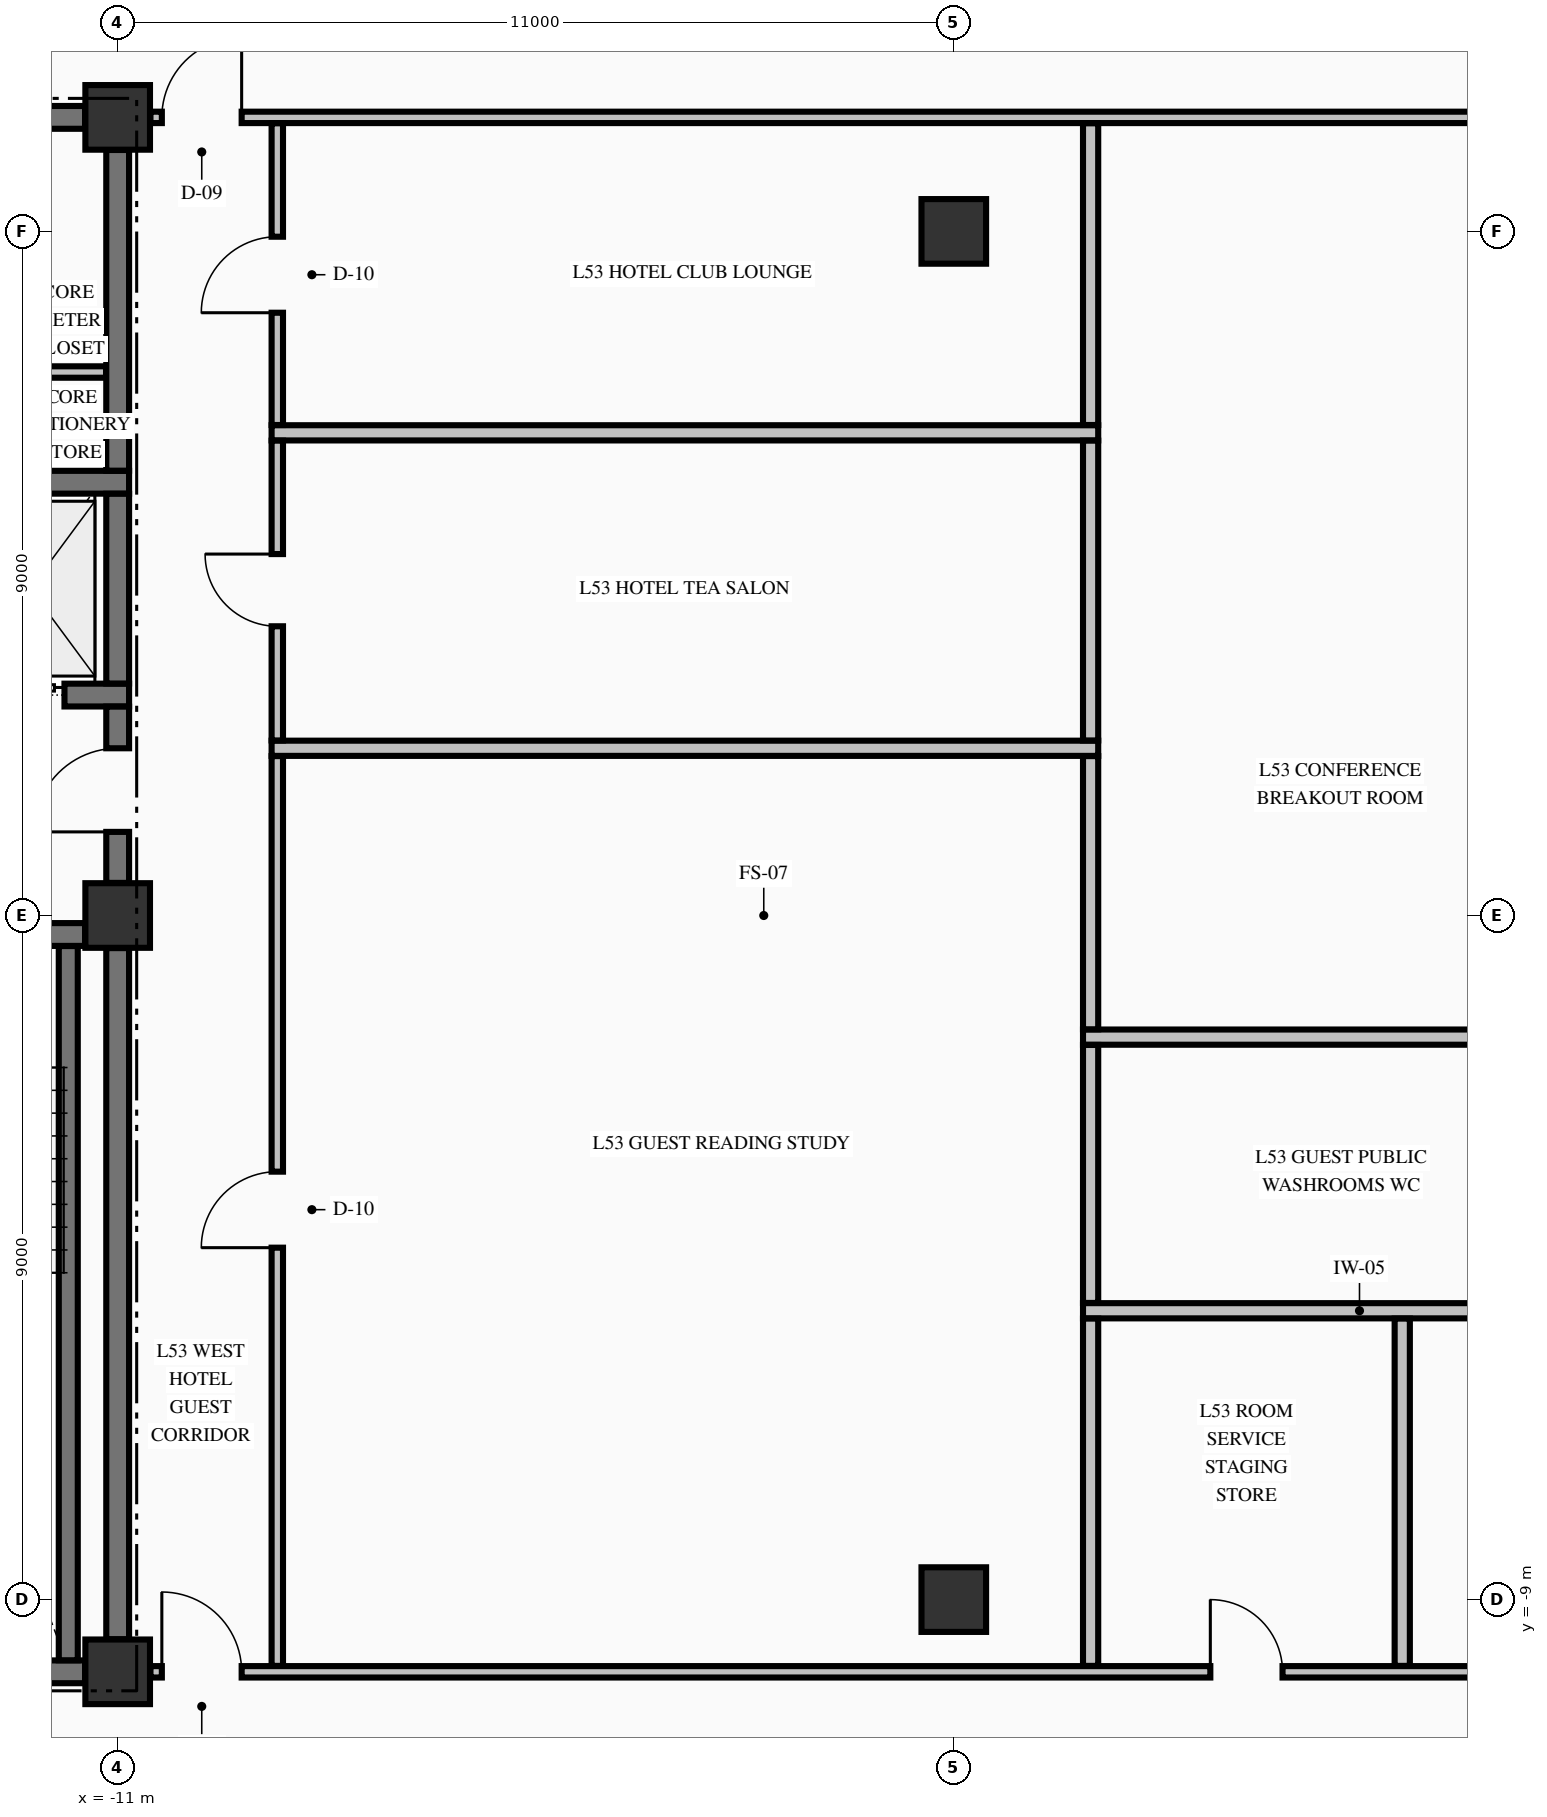
"""IFC4 building model, lengths in metres.
Left out: names, types, materials, properties, quantities, classifications, styles, units other than length and angle.
Written with IfcOpenShell. Run it as: python <this file> out.ifc"""

import sys

from ifc_helpers import new_model, si_unit, direction, frame, frame_2d, origin, origin_2d, place, context, subcontext, project, spatial, rectangle, extrude, element, fill, save


model = new_model("IFC4")
c1 = context("Model", 3, precision=1e-05, world=origin(), true_north=direction((0.0, 1.0)))
c2 = subcontext(c1, "Body", "Model", "MODEL_VIEW")
j1 = project(units=[si_unit("LENGTHUNIT", "METRE"), si_unit("PLANEANGLEUNIT", "RADIAN")], contexts=[c1])
p1 = place(None, origin())
s1 = spatial("IfcSite", under=j1, at=p1, CompositionType="ELEMENT")
p2 = place(p1, origin())
s2 = spatial("IfcBuilding", under=s1, at=p2, CompositionType="ELEMENT")
p3 = place(p2, frame((0.0, 0.0, 205.06)))
s3 = spatial("IfcBuildingStorey", under=s2, at=p3, CompositionType="ELEMENT", Elevation=205.06)
for number, where, z_axis, x_axis in (
    (1, (-11.0, -9.95, -0.25), (0.0, 0.0, 1.0), (1.0, 0.0, 0.0)),
    (2, (-11.0, 0.0, -0.25), (0.0, 0.0, 1.0), (1.0, 0.0, 0.0)),
    (3, (-11.0, 10.5, -0.25), (0.0, 0.0, 1.0), (1.0, 0.0, 0.0)),
    (4, (0.0, -9.0, -0.25), (0.0, 0.0, 1.0), (1.0, 0.0, 0.0)),
    (5, (0.0, 9.0, -0.25), (0.0, 0.0, 1.0), (1.0, 0.0, 0.0)),
):
    element("IfcColumn", number, at=place(p3, frame(where, z_axis=z_axis, x_axis=x_axis)), inside=s3, PredefinedType="COLUMN", context=c2, shape_type="SweptSolid", body=[
        extrude(rectangle(XDim=0.85, YDim=0.85, at=origin_2d()), origin(), (0.0, 0.0, 1.0), 3.4),
    ])
p4 = place(p3, frame((-14.7, -9.95, 0.0), z_axis=(0.0, 0.0, 1.0), x_axis=(1.0, 0.0, 0.0)))
e6 = element("IfcWall", 6, at=p4, inside=s3, PredefinedType="SHEAR", context=c2, shape_type="SweptSolid", body=[
    extrude(rectangle(XDim=3.271, YDim=0.3, at=frame_2d((1.635, 0.0))), origin(), (0.0, 0.0, 1.0), 3.15),
])
p5 = place(p3, frame((-19.571, -0.25, 0.0), z_axis=(0.0, 0.0, 1.0), x_axis=(1.0, 0.0, 0.0)))
e7 = element("IfcWall", 7, at=p5, inside=s3, PredefinedType="SHEAR", context=c2, shape_type="SweptSolid", body=[
    extrude(rectangle(XDim=8.142, YDim=0.3, at=frame_2d((4.071, 0.0))), origin(), (0.0, 0.0, 1.0), 3.15),
])
p6 = place(p5, frame((5.871, 0.0, 0.0)))
e8 = element("IfcOpeningElement", 8, at=p6, cuts=e7, PredefinedType="OPENING", context=c2, shape_type="SweptSolid", body=[
    extrude(rectangle(XDim=1.1, YDim=2.15, at=frame_2d((0.55, 1.075))), frame((0.0, 0.16, 0.0), z_axis=(0.0, -1.0, 0.0), x_axis=(1.0, 0.0, 0.0)), (0.0, 0.0, 1.0), 0.32),
])
p7 = place(p3, frame((-14.875, 2.9, 0.0), z_axis=(0.0, 0.0, 1.0), x_axis=(1.0, 0.0, 0.0)))
e9 = element("IfcWall", 9, at=p7, inside=s3, PredefinedType="SHEAR", context=c2, shape_type="SweptSolid", body=[
    extrude(rectangle(XDim=4.025, YDim=0.3, at=frame_2d((2.012, 0.0))), origin(), (0.0, 0.0, 1.0), 3.15),
])
p8 = place(p7, frame((2.075, 0.0, 0.0)))
e10 = element("IfcOpeningElement", 10, at=p8, cuts=e9, PredefinedType="OPENING", context=c2, shape_type="SweptSolid", body=[
    extrude(rectangle(XDim=1.1, YDim=2.2, at=frame_2d((0.55, 1.1))), frame((0.0, 0.16, 0.0), z_axis=(0.0, -1.0, 0.0), x_axis=(1.0, 0.0, 0.0)), (0.0, 0.0, 1.0), 0.32),
])
p9 = place(p3, frame((-14.875, 5.7, 0.0), z_axis=(0.0, 0.0, 1.0), x_axis=(1.0, 0.0, 0.0)))
e11 = element("IfcWall", 11, at=p9, inside=s3, PredefinedType="SHEAR", context=c2, shape_type="SweptSolid", body=[
    extrude(rectangle(XDim=4.025, YDim=0.3, at=frame_2d((2.012, 0.0))), origin(), (0.0, 0.0, 1.0), 3.15),
])
p10 = place(p3, frame((-14.7, 10.5, 0.0), z_axis=(0.0, 0.0, 1.0), x_axis=(1.0, 0.0, 0.0)))
e12 = element("IfcWall", 12, at=p10, inside=s3, PredefinedType="SHEAR", context=c2, shape_type="SweptSolid", body=[
    extrude(rectangle(XDim=3.271, YDim=0.3, at=frame_2d((1.635, 0.0))), origin(), (0.0, 0.0, 1.0), 3.15),
])
p11 = place(p10, frame((0.305, 0.0, 0.0)))
e13 = element("IfcOpeningElement", 13, at=p11, cuts=e12, PredefinedType="OPENING", context=c2, shape_type="SweptSolid", body=[
    extrude(rectangle(XDim=0.95, YDim=2.15, at=frame_2d((0.475, 1.075))), frame((0.0, 0.16, 0.0), z_axis=(0.0, -1.0, 0.0), x_axis=(1.0, 0.0, 0.0)), (0.0, 0.0, 1.0), 0.32),
])
p12 = place(p3, frame((-10.569, -9.95, 0.0), z_axis=(0.0, 0.0, 1.0), x_axis=(1.0, 0.0, 0.0)))
e14 = element("IfcWall", 14, at=p12, inside=s3, PredefinedType="PARTITIONING", context=c2, shape_type="SweptSolid", body=[
    extrude(rectangle(XDim=21.138, YDim=0.15, at=frame_2d((10.569, 0.0))), origin(), (0.0, 0.0, 1.0), 3.15),
])
p13 = place(p12, frame((0.15, 0.0, 0.0)))
e15 = element("IfcOpeningElement", 15, at=p13, cuts=e14, PredefinedType="OPENING", context=c2, shape_type="SweptSolid", body=[
    extrude(rectangle(XDim=1.05, YDim=2.15, at=frame_2d((0.525, 1.075))), frame((0.0, 0.085, 0.0), z_axis=(0.0, -1.0, 0.0), x_axis=(1.0, 0.0, 0.0)), (0.0, 0.0, 1.0), 0.17),
])
p14 = place(p12, frame((19.938, 0.0, 0.0)))
e16 = element("IfcOpeningElement", 16, at=p14, cuts=e14, PredefinedType="OPENING", context=c2, shape_type="SweptSolid", body=[
    extrude(rectangle(XDim=1.05, YDim=2.15, at=frame_2d((0.525, 1.075))), frame((0.0, 0.085, 0.0), z_axis=(0.0, -1.0, 0.0), x_axis=(1.0, 0.0, 0.0)), (0.0, 0.0, 1.0), 0.17),
])
p15 = place(p12, frame((13.944, 0.0, 0.0)))
e17 = element("IfcOpeningElement", 17, at=p15, cuts=e14, PredefinedType="OPENING", context=c2, shape_type="SweptSolid", body=[
    extrude(rectangle(XDim=0.95, YDim=2.15, at=frame_2d((0.475, 1.075))), frame((0.0, 0.085, 0.0), z_axis=(0.0, -1.0, 0.0), x_axis=(1.0, 0.0, 0.0)), (0.0, 0.0, 1.0), 0.17),
])
for number, where, z_axis, x_axis in (
    (18, (1.7, -5.2, 0.0), (0.0, 0.0, 1.0), (1.0, 0.0, 0.0)),
    (19, (1.7, -1.6, 0.0), (0.0, 0.0, 1.0), (1.0, 0.0, 0.0)),
):
    element("IfcWall", number, at=place(p3, frame(where, z_axis=z_axis, x_axis=x_axis)), inside=s3, PredefinedType="PARTITIONING", context=c2, shape_type="SweptSolid", body=[
        extrude(rectangle(XDim=7.275, YDim=0.2, at=frame_2d((3.638, 0.0))), origin(), (0.0, 0.0, 1.0), 3.15),
    ])
for number, where, z_axis, x_axis in (
    (20, (-8.975, 2.2, 0.0), (0.0, 0.0, 1.0), (1.0, 0.0, 0.0)),
    (21, (-8.975, 6.35, 0.0), (0.0, 0.0, 1.0), (1.0, 0.0, 0.0)),
):
    element("IfcWall", number, at=place(p3, frame(where, z_axis=z_axis, x_axis=x_axis)), inside=s3, PredefinedType="PARTITIONING", context=c2, shape_type="SweptSolid", body=[
        extrude(rectangle(XDim=10.875, YDim=0.2, at=frame_2d((5.438, 0.0))), origin(), (0.0, 0.0, 1.0), 3.15),
    ])
p16 = place(p3, frame((-13.225, 7.15, 0.0), z_axis=(0.0, 0.0, 1.0), x_axis=(1.0, 0.0, 0.0)))
e22 = element("IfcWall", 22, at=p16, inside=s3, PredefinedType="PARTITIONING", context=c2, shape_type="SweptSolid", body=[
    extrude(rectangle(XDim=2.072, YDim=0.15, at=frame_2d((1.036, 0.0))), origin(), (0.0, 0.0, 1.0), 3.15),
])
p17 = place(p3, frame((-10.569, 10.5, 0.0), z_axis=(0.0, 0.0, 1.0), x_axis=(1.0, 0.0, 0.0)))
e23 = element("IfcWall", 23, at=p17, inside=s3, PredefinedType="PARTITIONING", context=c2, shape_type="SweptSolid", body=[
    extrude(rectangle(XDim=21.138, YDim=0.15, at=frame_2d((10.569, 0.0))), origin(), (0.0, 0.0, 1.0), 3.15),
])
p18 = place(p17, frame((0.15, 0.0, 0.0)))
e24 = element("IfcOpeningElement", 24, at=p18, cuts=e23, PredefinedType="OPENING", context=c2, shape_type="SweptSolid", body=[
    extrude(rectangle(XDim=1.05, YDim=2.15, at=frame_2d((0.525, 1.075))), frame((0.0, 0.085, 0.0), z_axis=(0.0, -1.0, 0.0), x_axis=(1.0, 0.0, 0.0)), (0.0, 0.0, 1.0), 0.17),
])
p19 = place(p17, frame((19.938, 0.0, 0.0)))
e25 = element("IfcOpeningElement", 25, at=p19, cuts=e23, PredefinedType="OPENING", context=c2, shape_type="SweptSolid", body=[
    extrude(rectangle(XDim=1.05, YDim=2.15, at=frame_2d((0.525, 1.075))), frame((0.0, 0.085, 0.0), z_axis=(0.0, -1.0, 0.0), x_axis=(1.0, 0.0, 0.0)), (0.0, 0.0, 1.0), 0.17),
])
p20 = place(p3, frame((-11.65, -9.798, 0.0), z_axis=(0.0, 0.0, 1.0), x_axis=(0.0, 1.0, 0.0)))
e26 = element("IfcWall", 26, at=p20, inside=s3, PredefinedType="SOLIDWALL", context=c2, shape_type="SweptSolid", body=[
    extrude(rectangle(XDim=9.396, YDim=0.25, at=frame_2d((4.698, 0.0))), origin(), (0.0, 0.0, 1.0), 3.15),
])
p21 = place(p3, frame((-11.0, -9.521, 0.0), z_axis=(0.0, 0.0, 1.0), x_axis=(0.0, 1.0, 0.0)))
e27 = element("IfcWall", 27, at=p21, inside=s3, PredefinedType="SHEAR", context=c2, shape_type="SweptSolid", body=[
    extrude(rectangle(XDim=9.092, YDim=0.3, at=frame_2d((4.546, 0.0))), origin(), (0.0, 0.0, 1.0), 3.15),
])
p22 = place(p3, frame((-11.0, 0.429, 0.0), z_axis=(0.0, 0.0, 1.0), x_axis=(0.0, 1.0, 0.0)))
e28 = element("IfcWall", 28, at=p22, inside=s3, PredefinedType="SHEAR", context=c2, shape_type="SweptSolid", body=[
    extrude(rectangle(XDim=2.319, YDim=0.3, at=frame_2d((1.16, 0.0))), origin(), (0.0, 0.0, 1.0), 3.15),
])
p23 = place(p22, frame((0.671, 0.0, 0.0)))
e29 = element("IfcOpeningElement", 29, at=p23, cuts=e28, PredefinedType="OPENING", context=c2, shape_type="SweptSolid", body=[
    extrude(rectangle(XDim=1.1, YDim=2.15, at=frame_2d((0.55, 1.075))), frame((0.0, 0.16, 0.0), z_axis=(0.0, -1.0, 0.0), x_axis=(1.0, 0.0, 0.0)), (0.0, 0.0, 1.0), 0.32),
])
p24 = place(p3, frame((-11.0, 3.052, 0.0), z_axis=(0.0, 0.0, 1.0), x_axis=(0.0, 1.0, 0.0)))
e30 = element("IfcWall", 30, at=p24, inside=s3, PredefinedType="SHEAR", context=c2, shape_type="SweptSolid", body=[
    extrude(rectangle(XDim=2.496, YDim=0.3, at=frame_2d((1.248, 0.0))), origin(), (0.0, 0.0, 1.0), 3.15),
])
p25 = place(p3, frame((-11.0, 5.852, 0.0), z_axis=(0.0, 0.0, 1.0), x_axis=(0.0, 1.0, 0.0)))
e31 = element("IfcWall", 31, at=p25, inside=s3, PredefinedType="SHEAR", context=c2, shape_type="SweptSolid", body=[
    extrude(rectangle(XDim=4.219, YDim=0.3, at=frame_2d((2.109, 0.0))), origin(), (0.0, 0.0, 1.0), 3.15),
])
p26 = place(p3, frame((-8.9, -9.872, 0.0), z_axis=(0.0, 0.0, 1.0), x_axis=(0.0, 1.0, 0.0)))
e32 = element("IfcWall", 32, at=p26, inside=s3, PredefinedType="PARTITIONING", context=c2, shape_type="SweptSolid", body=[
    extrude(rectangle(XDim=11.969, YDim=0.15, at=frame_2d((5.984, 0.0))), origin(), (0.0, 0.0, 1.0), 3.15),
])
p27 = place(p26, frame((5.502, 0.0, 0.0)))
e33 = element("IfcOpeningElement", 33, at=p27, cuts=e32, PredefinedType="OPENING", context=c2, shape_type="SweptSolid", body=[
    extrude(rectangle(XDim=1.0, YDim=2.15, at=frame_2d((0.5, 1.075))), frame((0.0, 0.085, 0.0), z_axis=(0.0, -1.0, 0.0), x_axis=(1.0, 0.0, 0.0)), (0.0, 0.0, 1.0), 0.17),
])
p28 = place(p3, frame((-8.9, 2.303, 0.0), z_axis=(0.0, 0.0, 1.0), x_axis=(0.0, 1.0, 0.0)))
e34 = element("IfcWall", 34, at=p28, inside=s3, PredefinedType="PARTITIONING", context=c2, shape_type="SweptSolid", body=[
    extrude(rectangle(XDim=3.944, YDim=0.15, at=frame_2d((1.972, 0.0))), origin(), (0.0, 0.0, 1.0), 3.15),
])
p29 = place(p28, frame((1.502, 0.0, 0.0)))
e35 = element("IfcOpeningElement", 35, at=p29, cuts=e34, PredefinedType="OPENING", context=c2, shape_type="SweptSolid", body=[
    extrude(rectangle(XDim=0.95, YDim=2.15, at=frame_2d((0.475, 1.075))), frame((0.0, 0.085, 0.0), z_axis=(0.0, -1.0, 0.0), x_axis=(1.0, 0.0, 0.0)), (0.0, 0.0, 1.0), 0.17),
])
p30 = place(p3, frame((-8.9, 6.453, 0.0), z_axis=(0.0, 0.0, 1.0), x_axis=(0.0, 1.0, 0.0)))
e36 = element("IfcWall", 36, at=p30, inside=s3, PredefinedType="PARTITIONING", context=c2, shape_type="SweptSolid", body=[
    extrude(rectangle(XDim=3.969, YDim=0.15, at=frame_2d((1.985, 0.0))), origin(), (0.0, 0.0, 1.0), 3.15),
])
p31 = place(p30, frame((1.477, 0.0, 0.0)))
e37 = element("IfcOpeningElement", 37, at=p31, cuts=e36, PredefinedType="OPENING", context=c2, shape_type="SweptSolid", body=[
    extrude(rectangle(XDim=1.0, YDim=2.15, at=frame_2d((0.5, 1.075))), frame((0.0, 0.085, 0.0), z_axis=(0.0, -1.0, 0.0), x_axis=(1.0, 0.0, 0.0)), (0.0, 0.0, 1.0), 0.17),
])
p32 = place(p3, frame((1.8, -9.872, 0.0), z_axis=(0.0, 0.0, 1.0), x_axis=(0.0, 1.0, 0.0)))
e38 = element("IfcWall", 38, at=p32, inside=s3, PredefinedType="PARTITIONING", context=c2, shape_type="SweptSolid", body=[
    extrude(rectangle(XDim=4.569, YDim=0.2, at=frame_2d((2.285, 0.0))), origin(), (0.0, 0.0, 1.0), 3.15),
])
p33 = place(p3, frame((1.8, -5.097, 0.0), z_axis=(0.0, 0.0, 1.0), x_axis=(0.0, 1.0, 0.0)))
e39 = element("IfcWall", 39, at=p33, inside=s3, PredefinedType="PARTITIONING", context=c2, shape_type="SweptSolid", body=[
    extrude(rectangle(XDim=3.394, YDim=0.2, at=frame_2d((1.697, 0.0))), origin(), (0.0, 0.0, 1.0), 3.15),
])
p34 = place(p3, frame((1.8, -1.497, 0.0), z_axis=(0.0, 0.0, 1.0), x_axis=(0.0, 1.0, 0.0)))
e40 = element("IfcWall", 40, at=p34, inside=s3, PredefinedType="PARTITIONING", context=c2, shape_type="SweptSolid", body=[
    extrude(rectangle(XDim=3.594, YDim=0.2, at=frame_2d((1.797, 0.0))), origin(), (0.0, 0.0, 1.0), 3.15),
])
p35 = place(p3, frame((1.8, 2.303, 0.0), z_axis=(0.0, 0.0, 1.0), x_axis=(0.0, 1.0, 0.0)))
e41 = element("IfcWall", 41, at=p35, inside=s3, PredefinedType="PARTITIONING", context=c2, shape_type="SweptSolid", body=[
    extrude(rectangle(XDim=3.944, YDim=0.2, at=frame_2d((1.972, 0.0))), origin(), (0.0, 0.0, 1.0), 3.15),
])
p36 = place(p3, frame((1.8, 6.453, 0.0), z_axis=(0.0, 0.0, 1.0), x_axis=(0.0, 1.0, 0.0)))
e42 = element("IfcWall", 42, at=p36, inside=s3, PredefinedType="PARTITIONING", context=c2, shape_type="SweptSolid", body=[
    extrude(rectangle(XDim=3.969, YDim=0.2, at=frame_2d((1.985, 0.0))), origin(), (0.0, 0.0, 1.0), 3.15),
])
p37 = place(p3, frame((5.9, -9.872, 0.0), z_axis=(0.0, 0.0, 1.0), x_axis=(0.0, 1.0, 0.0)))
e43 = element("IfcWall", 43, at=p37, inside=s3, PredefinedType="PARTITIONING", context=c2, shape_type="SweptSolid", body=[
    extrude(rectangle(XDim=4.569, YDim=0.2, at=frame_2d((2.285, 0.0))), origin(), (0.0, 0.0, 1.0), 3.15),
])
p38 = place(p23, origin())
e44 = element("IfcDoor", 44, at=p38, inside=s3, OperationType="SINGLE_SWING_LEFT", PredefinedType="DOOR", context=c2, shape_type="SweptSolid", body=[
    extrude(rectangle(XDim=1.1, YDim=2.15, at=frame_2d((0.55, 1.075))), frame((0.0, 0.025, 0.0), z_axis=(0.0, -1.0, 0.0), x_axis=(1.0, 0.0, 0.0)), (0.0, 0.0, 1.0), 0.05),
])
fill(e29, e44)
p39 = place(p8, origin())
e45 = element("IfcDoor", 45, at=p39, inside=s3, OperationType="SLIDING_TO_LEFT", PredefinedType="DOOR", context=c2, shape_type="SweptSolid", body=[
    extrude(rectangle(XDim=1.1, YDim=2.2, at=frame_2d((0.55, 1.1))), frame((0.0, 0.025, 0.0), z_axis=(0.0, -1.0, 0.0), x_axis=(1.0, 0.0, 0.0)), (0.0, 0.0, 1.0), 0.05),
])
fill(e10, e45)
p40 = place(p18, origin())
e46 = element("IfcDoor", 46, at=p40, inside=s3, OperationType="SINGLE_SWING_RIGHT", PredefinedType="DOOR", context=c2, shape_type="SweptSolid", body=[
    extrude(rectangle(XDim=1.05, YDim=2.15, at=frame_2d((0.525, 1.075))), frame((0.0, 0.025, 0.0), z_axis=(0.0, -1.0, 0.0), x_axis=(1.0, 0.0, 0.0)), (0.0, 0.0, 1.0), 0.05),
])
fill(e24, e46)
p41 = place(p13, origin())
e47 = element("IfcDoor", 47, at=p41, inside=s3, OperationType="SINGLE_SWING_LEFT", PredefinedType="DOOR", context=c2, shape_type="SweptSolid", body=[
    extrude(rectangle(XDim=1.05, YDim=2.15, at=frame_2d((0.525, 1.075))), frame((0.0, 0.025, 0.0), z_axis=(0.0, -1.0, 0.0), x_axis=(1.0, 0.0, 0.0)), (0.0, 0.0, 1.0), 0.05),
])
fill(e15, e47)
p42 = place(p31, origin())
e48 = element("IfcDoor", 48, at=p42, inside=s3, OperationType="SINGLE_SWING_LEFT", PredefinedType="DOOR", context=c2, shape_type="SweptSolid", body=[
    extrude(rectangle(XDim=1.0, YDim=2.15, at=frame_2d((0.5, 1.075))), frame((0.0, 0.025, 0.0), z_axis=(0.0, -1.0, 0.0), x_axis=(1.0, 0.0, 0.0)), (0.0, 0.0, 1.0), 0.05),
])
fill(e37, e48)
p43 = place(p29, origin())
e49 = element("IfcDoor", 49, at=p43, inside=s3, OperationType="SINGLE_SWING_RIGHT", PredefinedType="DOOR", context=c2, shape_type="SweptSolid", body=[
    extrude(rectangle(XDim=0.95, YDim=2.15, at=frame_2d((0.475, 1.075))), frame((0.0, 0.025, 0.0), z_axis=(0.0, -1.0, 0.0), x_axis=(1.0, 0.0, 0.0)), (0.0, 0.0, 1.0), 0.05),
])
fill(e35, e49)
p44 = place(p27, origin())
e50 = element("IfcDoor", 50, at=p44, inside=s3, OperationType="SINGLE_SWING_LEFT", PredefinedType="DOOR", context=c2, shape_type="SweptSolid", body=[
    extrude(rectangle(XDim=1.0, YDim=2.15, at=frame_2d((0.5, 1.075))), frame((0.0, 0.025, 0.0), z_axis=(0.0, -1.0, 0.0), x_axis=(1.0, 0.0, 0.0)), (0.0, 0.0, 1.0), 0.05),
])
fill(e33, e50)
p45 = place(p15, origin())
e51 = element("IfcDoor", 51, at=p45, inside=s3, OperationType="SINGLE_SWING_LEFT", PredefinedType="DOOR", context=c2, shape_type="SweptSolid", body=[
    extrude(rectangle(XDim=0.95, YDim=2.15, at=frame_2d((0.475, 1.075))), frame((0.0, 0.025, 0.0), z_axis=(0.0, -1.0, 0.0), x_axis=(1.0, 0.0, 0.0)), (0.0, 0.0, 1.0), 0.05),
])
fill(e17, e51)
save(model, sys.argv[1])
